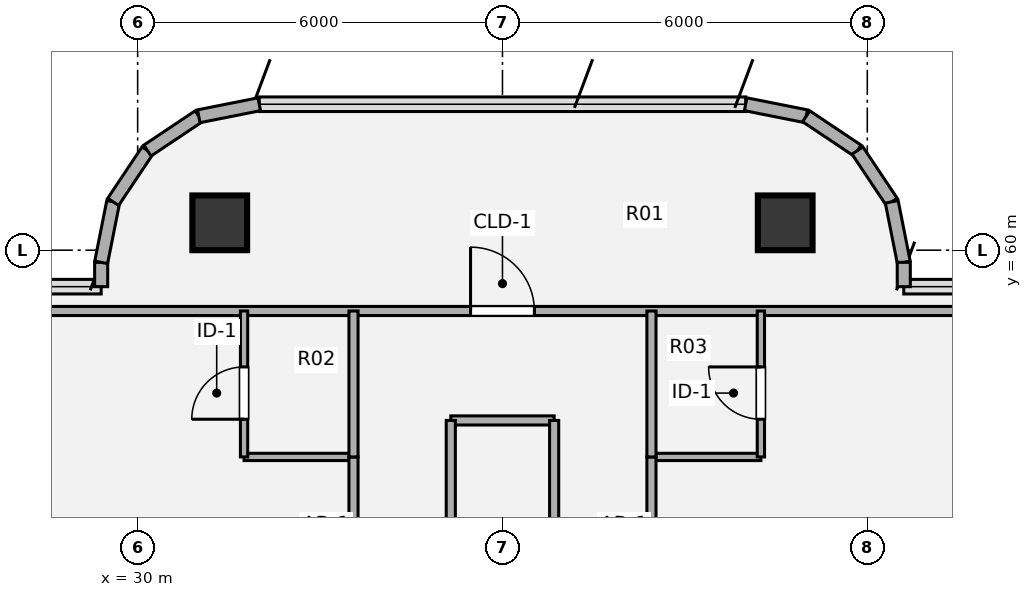
"""IFC4 building model, lengths in metres.
Left out: names, types, materials, properties, quantities, classifications, styles, units other than length and angle.
Written with IfcOpenShell. Run it as: python <this file> out.ifc"""

import sys

from ifc_helpers import new_model, si_unit, direction, frame, frame_2d, origin, origin_2d, place, context, subcontext, project, spatial, rectangle, hollow_circle, extrude, source, transform, mapped, element, fill, save


model = new_model("IFC4")
c1 = context("Model", 3, precision=1e-05, world=origin(), true_north=direction((0.0, 1.0)))
c2 = subcontext(c1, "Body", "Model", "MODEL_VIEW")
j1 = project(units=[si_unit("LENGTHUNIT", "METRE"), si_unit("PLANEANGLEUNIT", "RADIAN")], contexts=[c1])
p1 = place(None, origin())
s1 = spatial("IfcSite", under=j1, at=p1, CompositionType="ELEMENT")
p2 = place(p1, origin())
s2 = spatial("IfcBuilding", under=s1, at=p2, CompositionType="ELEMENT")
p3 = place(p2, frame((0.0, 0.0, 230.58)))
s3 = spatial("IfcBuildingStorey", under=s2, at=p3, CompositionType="ELEMENT", Elevation=230.58)
m1 = source(origin(), c2, "Body", "SweptSolid", [
    extrude(hollow_circle(Radius=0.45, WallThickness=0.032, at=origin_2d()), origin(), (0.0, 0.0, 1.0), 3.78),
])
for number, where, z_axis, x_axis in (
    (1, (31.35, 60.45, 0.0), (0.0, 0.0, 1.0), (1.0, 0.0, 0.0)),
    (2, (40.65, 60.45, 0.0), (0.0, 0.0, 1.0), (1.0, 0.0, 0.0)),
):
    element("IfcColumn", number, at=place(p3, frame(where, z_axis=z_axis, x_axis=x_axis)), inside=s3, PredefinedType="COLUMN", context=c2, shape_type="MappedRepresentation", body=[
        mapped(m1, transform((0.0, 0.0, 0.0), x_axis=(1.0, 0.0, 0.0), y_axis=(0.0, 1.0, 0.0), z_axis=(0.0, 0.0, 1.0), scale=1.0)),
    ])
p4 = place(p3, frame((29.4, 59.4, 0.0), z_axis=(0.0, 0.0, 1.0), x_axis=(0.0, 1.0, 0.0)))
e3 = element("IfcWall", 3, at=p4, inside=s3, PredefinedType="SOLIDWALL", context=c2, shape_type="SweptSolid", body=[
    extrude(rectangle(XDim=0.4, YDim=0.215, at=frame_2d((0.2, 0.0))), origin(), (0.0, 0.0, 1.0), 3.53),
])
p5 = place(p3, frame((29.4, 59.8, 0.0), z_axis=(0.0, 0.0, 1.0), x_axis=(0.195190360752, 0.980765376158, 0.0)))
e4 = element("IfcWall", 4, at=p5, inside=s3, PredefinedType="SOLIDWALL", context=c2, shape_type="SweptSolid", body=[
    extrude(rectangle(XDim=1.014, YDim=0.215, at=frame_2d((0.507, 0.0))), origin(), (0.0, 0.0, 1.0), 3.53),
])
p6 = place(p3, frame((29.598, 60.795, 0.0), z_axis=(0.0, 0.0, 1.0), x_axis=(0.555643898837, 0.831420385657, 0.0)))
e5 = element("IfcWall", 5, at=p6, inside=s3, PredefinedType="SOLIDWALL", context=c2, shape_type="SweptSolid", body=[
    extrude(rectangle(XDim=1.015, YDim=0.215, at=frame_2d((0.507, 0.0))), origin(), (0.0, 0.0, 1.0), 3.53),
])
p7 = place(p3, frame((30.162, 61.638, 0.0), z_axis=(0.0, 0.0, 1.0), x_axis=(0.831346067305, 0.555755086685, 0.0)))
e6 = element("IfcWall", 6, at=p7, inside=s3, PredefinedType="SOLIDWALL", context=c2, shape_type="SweptSolid", body=[
    extrude(rectangle(XDim=1.014, YDim=0.215, at=frame_2d((0.507, 0.0))), origin(), (0.0, 0.0, 1.0), 3.53),
])
for number, where, z_axis, x_axis in (
    (7, (31.005, 62.202, 0.0), (0.0, 0.0, 1.0), (0.981, 0.195, 0.0)),
    (8, (40.0, 62.4, 0.0), (0.0, 0.0, 1.0), (0.981, -0.195, 0.0)),
):
    element("IfcWall", number, at=place(p3, frame(where, z_axis=z_axis, x_axis=x_axis)), inside=s3, PredefinedType="SOLIDWALL", context=c2, shape_type="SweptSolid", body=[
        extrude(rectangle(XDim=1.015, YDim=0.215, at=frame_2d((0.507, 0.0))), origin(), (0.0, 0.0, 1.0), 3.53),
    ])
p8 = place(p3, frame((40.995, 62.202, 0.0), z_axis=(0.0, 0.0, 1.0), x_axis=(0.831346067305, -0.555755086685, 0.0)))
e9 = element("IfcWall", 9, at=p8, inside=s3, PredefinedType="SOLIDWALL", context=c2, shape_type="SweptSolid", body=[
    extrude(rectangle(XDim=1.014, YDim=0.215, at=frame_2d((0.507, 0.0))), origin(), (0.0, 0.0, 1.0), 3.53),
])
p9 = place(p3, frame((41.838, 61.638, 0.0), z_axis=(0.0, 0.0, 1.0), x_axis=(0.555643898837, -0.831420385657, 0.0)))
e10 = element("IfcWall", 10, at=p9, inside=s3, PredefinedType="SOLIDWALL", context=c2, shape_type="SweptSolid", body=[
    extrude(rectangle(XDim=1.015, YDim=0.215, at=frame_2d((0.507, 0.0))), origin(), (0.0, 0.0, 1.0), 3.53),
])
p10 = place(p3, frame((42.402, 60.795, 0.0), z_axis=(0.0, 0.0, 1.0), x_axis=(0.195190360752, -0.980765376158, 0.0)))
e11 = element("IfcWall", 11, at=p10, inside=s3, PredefinedType="SOLIDWALL", context=c2, shape_type="SweptSolid", body=[
    extrude(rectangle(XDim=1.014, YDim=0.215, at=frame_2d((0.507, 0.0))), origin(), (0.0, 0.0, 1.0), 3.53),
])
p11 = place(p3, frame((42.6, 59.8, 0.0), z_axis=(0.0, 0.0, 1.0), x_axis=(0.0, -1.0, 0.0)))
e12 = element("IfcWall", 12, at=p11, inside=s3, PredefinedType="SOLIDWALL", context=c2, shape_type="SweptSolid", body=[
    extrude(rectangle(XDim=0.4, YDim=0.215, at=frame_2d((0.2, 0.0))), origin(), (0.0, 0.0, 1.0), 3.53),
])
for number, where, z_axis, x_axis in (
    (13, (31.75, 56.6, 0.0), (0.0, 0.0, 1.0), (1.0, 0.0, 0.0)),
    (14, (38.45, 56.6, 0.0), (0.0, 0.0, 1.0), (1.0, 0.0, 0.0)),
):
    element("IfcWall", number, at=place(p3, frame(where, z_axis=z_axis, x_axis=x_axis)), inside=s3, PredefinedType="PARTITIONING", context=c2, shape_type="SweptSolid", body=[
        extrude(rectangle(XDim=1.8, YDim=0.12, at=frame_2d((0.9, 0.0))), origin(), (0.0, 0.0, 1.0), 3.259),
    ])
p12 = place(p3, frame((35.15, 57.2, 0.0), z_axis=(0.0, 0.0, 1.0), x_axis=(1.0, 0.0, 0.0)))
e15 = element("IfcWall", 15, at=p12, inside=s3, PredefinedType="PARTITIONING", context=c2, shape_type="SweptSolid", body=[
    extrude(rectangle(XDim=1.7, YDim=0.15, at=frame_2d((0.85, 0.0))), origin(), (0.0, 0.0, 1.0), 3.308),
])
p13 = place(p3, frame((27.1, 59.0, 0.0), z_axis=(0.0, 0.0, 1.0), x_axis=(1.0, 0.0, 0.0)))
e16 = element("IfcWall", 16, at=p13, inside=s3, PredefinedType="PARTITIONING", context=c2, shape_type="SweptSolid", body=[
    extrude(rectangle(XDim=17.8, YDim=0.15, at=frame_2d((8.9, 0.0))), origin(), (0.0, 0.0, 1.0), 3.308),
])
p14 = place(p13, frame((8.375, 0.0, 0.0)))
e17 = element("IfcOpeningElement", 17, at=p14, cuts=e16, PredefinedType="OPENING", context=c2, shape_type="SweptSolid", body=[
    extrude(rectangle(XDim=1.05, YDim=2.1, at=origin_2d()), frame((0.525, 0.085, 1.05), z_axis=(0.0, -1.0, 0.0), x_axis=(1.0, 0.0, 0.0)), (0.0, 0.0, 1.0), 0.17),
])
p15 = place(p3, frame((31.75, 56.6, 0.0), z_axis=(0.0, 0.0, 1.0), x_axis=(0.0, 1.0, 0.0)))
e18 = element("IfcWall", 18, at=p15, inside=s3, PredefinedType="PARTITIONING", context=c2, shape_type="SweptSolid", body=[
    extrude(rectangle(XDim=2.4, YDim=0.12, at=frame_2d((1.2, 0.0))), origin(), (0.0, 0.0, 1.0), 3.5),
])
p16 = place(p15, frame((0.62, 0.0, 0.0)))
e19 = element("IfcOpeningElement", 19, at=p16, cuts=e18, PredefinedType="OPENING", context=c2, shape_type="SweptSolid", body=[
    extrude(rectangle(XDim=0.86, YDim=2.1, at=origin_2d()), frame((0.43, 0.07, 1.05), z_axis=(0.0, -1.0, 0.0), x_axis=(1.0, 0.0, 0.0)), (0.0, 0.0, 1.0), 0.14),
])
p17 = place(p3, frame((33.55, 52.352, 0.0), z_axis=(0.0, 0.0, 1.0), x_axis=(0.0, 1.0, 0.0)))
e20 = element("IfcWall", 20, at=p17, inside=s3, PredefinedType="PARTITIONING", context=c2, shape_type="SweptSolid", body=[
    extrude(rectangle(XDim=4.248, YDim=0.15, at=frame_2d((2.124, 0.0))), origin(), (0.0, 0.0, 1.0), 3.5),
])
p18 = place(p17, frame((1.664, 0.0, 0.0)))
e21 = element("IfcOpeningElement", 21, at=p18, cuts=e20, PredefinedType="OPENING", context=c2, shape_type="SweptSolid", body=[
    extrude(rectangle(XDim=0.92, YDim=2.1, at=origin_2d()), frame((0.46, 0.085, 1.05), z_axis=(0.0, -1.0, 0.0), x_axis=(1.0, 0.0, 0.0)), (0.0, 0.0, 1.0), 0.17),
])
p19 = place(p3, frame((33.55, 56.6, 0.0), z_axis=(0.0, 0.0, 1.0), x_axis=(0.0, 1.0, 0.0)))
e22 = element("IfcWall", 22, at=p19, inside=s3, PredefinedType="PARTITIONING", context=c2, shape_type="SweptSolid", body=[
    extrude(rectangle(XDim=2.4, YDim=0.15, at=frame_2d((1.2, 0.0))), origin(), (0.0, 0.0, 1.0), 3.5),
])
p20 = place(p3, frame((35.15, 44.62, 0.0), z_axis=(0.0, 0.0, 1.0), x_axis=(0.0, 1.0, 0.0)))
e23 = element("IfcWall", 23, at=p20, inside=s3, PredefinedType="PARTITIONING", context=c2, shape_type="SweptSolid", body=[
    extrude(rectangle(XDim=12.58, YDim=0.15, at=frame_2d((6.29, 0.0))), origin(), (0.0, 0.0, 1.0), 3.5),
])
p21 = place(p20, frame((5.83, 0.0, 0.0)))
e24 = element("IfcOpeningElement", 24, at=p21, cuts=e23, PredefinedType="OPENING", context=c2, shape_type="SweptSolid", body=[
    extrude(rectangle(XDim=0.86, YDim=2.1, at=origin_2d()), frame((0.43, 0.085, 1.05), z_axis=(0.0, -1.0, 0.0), x_axis=(1.0, 0.0, 0.0)), (0.0, 0.0, 1.0), 0.17),
])
p22 = place(p3, frame((36.85, 44.62, 0.0), z_axis=(0.0, 0.0, 1.0), x_axis=(0.0, 1.0, 0.0)))
e25 = element("IfcWall", 25, at=p22, inside=s3, PredefinedType="PARTITIONING", context=c2, shape_type="SweptSolid", body=[
    extrude(rectangle(XDim=12.58, YDim=0.15, at=frame_2d((6.29, 0.0))), origin(), (0.0, 0.0, 1.0), 3.5),
])
p23 = place(p3, frame((38.45, 52.352, 0.0), z_axis=(0.0, 0.0, 1.0), x_axis=(0.0, 1.0, 0.0)))
e26 = element("IfcWall", 26, at=p23, inside=s3, PredefinedType="PARTITIONING", context=c2, shape_type="SweptSolid", body=[
    extrude(rectangle(XDim=4.248, YDim=0.15, at=frame_2d((2.124, 0.0))), origin(), (0.0, 0.0, 1.0), 3.5),
])
p24 = place(p23, frame((1.664, 0.0, 0.0)))
e27 = element("IfcOpeningElement", 27, at=p24, cuts=e26, PredefinedType="OPENING", context=c2, shape_type="SweptSolid", body=[
    extrude(rectangle(XDim=0.92, YDim=2.1, at=origin_2d()), frame((0.46, 0.085, 1.05), z_axis=(0.0, -1.0, 0.0), x_axis=(1.0, 0.0, 0.0)), (0.0, 0.0, 1.0), 0.17),
])
p25 = place(p3, frame((38.45, 56.6, 0.0), z_axis=(0.0, 0.0, 1.0), x_axis=(0.0, 1.0, 0.0)))
e28 = element("IfcWall", 28, at=p25, inside=s3, PredefinedType="PARTITIONING", context=c2, shape_type="SweptSolid", body=[
    extrude(rectangle(XDim=2.4, YDim=0.15, at=frame_2d((1.2, 0.0))), origin(), (0.0, 0.0, 1.0), 3.5),
])
p26 = place(p3, frame((40.25, 56.6, 0.0), z_axis=(0.0, 0.0, 1.0), x_axis=(0.0, 1.0, 0.0)))
e29 = element("IfcWall", 29, at=p26, inside=s3, PredefinedType="PARTITIONING", context=c2, shape_type="SweptSolid", body=[
    extrude(rectangle(XDim=2.4, YDim=0.12, at=frame_2d((1.2, 0.0))), origin(), (0.0, 0.0, 1.0), 3.5),
])
p27 = place(p26, frame((0.62, 0.0, 0.0)))
e30 = element("IfcOpeningElement", 30, at=p27, cuts=e29, PredefinedType="OPENING", context=c2, shape_type="SweptSolid", body=[
    extrude(rectangle(XDim=0.86, YDim=2.1, at=origin_2d()), frame((0.43, 0.07, 1.05), z_axis=(0.0, -1.0, 0.0), x_axis=(1.0, 0.0, 0.0)), (0.0, 0.0, 1.0), 0.14),
])
m2 = source(origin(), c2, "Body", "SweptSolid", [
    extrude(rectangle(XDim=1.05, YDim=2.1, at=origin_2d()), frame((0.525, 0.025, 1.05), z_axis=(0.0, -1.0, 0.0), x_axis=(1.0, 0.0, 0.0)), (0.0, 0.0, 1.0), 0.05),
])
p28 = place(p14, origin())
e31 = element("IfcDoor", 31, at=p28, inside=s3, OperationType="SINGLE_SWING_LEFT", PredefinedType="DOOR", context=c2, shape_type="MappedRepresentation", body=[
    mapped(m2, transform((0.0, 0.0, 0.0), x_axis=(1.0, 0.0, 0.0), y_axis=(0.0, 1.0, 0.0), z_axis=(0.0, 0.0, 1.0), scale=1.0)),
])
fill(e17, e31)
m3 = source(origin(), c2, "Body", "SweptSolid", [
    extrude(rectangle(XDim=0.86, YDim=2.1, at=origin_2d()), frame((0.43, 0.025, 1.05), z_axis=(0.0, -1.0, 0.0), x_axis=(1.0, 0.0, 0.0)), (0.0, 0.0, 1.0), 0.05),
])
p29 = place(p16, origin())
e32 = element("IfcDoor", 32, at=p29, inside=s3, OperationType="SINGLE_SWING_LEFT", PredefinedType="DOOR", context=c2, shape_type="MappedRepresentation", body=[
    mapped(m3, transform((0.0, 0.0, 0.0), x_axis=(1.0, 0.0, 0.0), y_axis=(0.0, 1.0, 0.0), z_axis=(0.0, 0.0, 1.0), scale=1.0)),
])
fill(e19, e32)
p30 = place(p27, origin())
e33 = element("IfcDoor", 33, at=p30, inside=s3, OperationType="SINGLE_SWING_RIGHT", PredefinedType="DOOR", context=c2, shape_type="MappedRepresentation", body=[
    mapped(m3, transform((0.0, 0.0, 0.0), x_axis=(1.0, 0.0, 0.0), y_axis=(0.0, 1.0, 0.0), z_axis=(0.0, 0.0, 1.0), scale=1.0)),
])
fill(e30, e33)
save(model, sys.argv[1])
